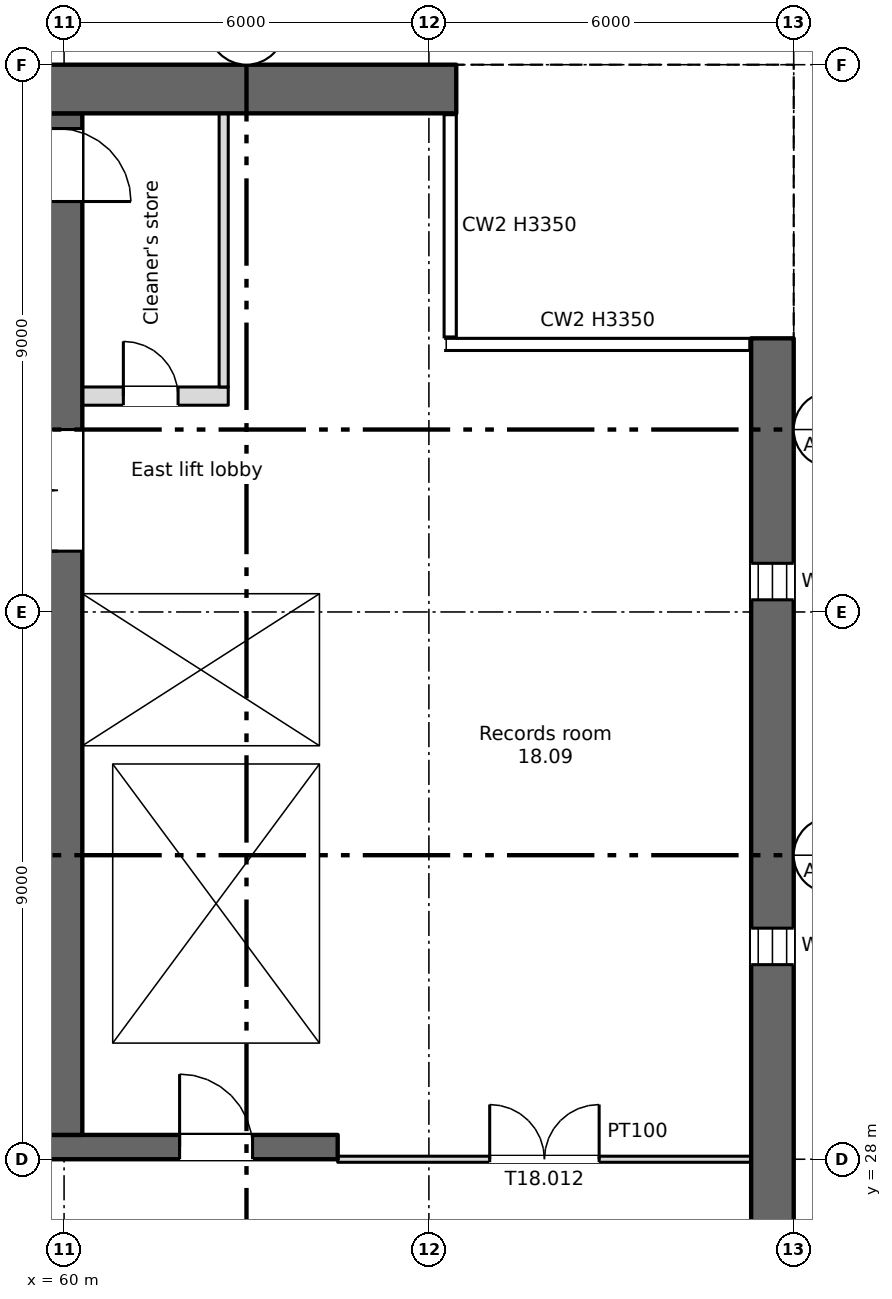
"""IFC4 building model, lengths in metres.
Left out: names, types, materials, properties, quantities, classifications, styles, units other than length and angle.
Written with IfcOpenShell. Run it as: python <this file> out.ifc"""

import sys

from ifc_helpers import new_model, si_unit, direction, frame, frame_2d, origin, place, context, subcontext, project, spatial, rectangle, extrude, element, fill, save


model = new_model("IFC4")
c1 = context("Model", 3, precision=1e-05, world=origin(), true_north=direction((0.0, 1.0)))
c2 = subcontext(c1, "Body", "Model", "MODEL_VIEW")
j1 = project(units=[si_unit("LENGTHUNIT", "METRE"), si_unit("PLANEANGLEUNIT", "RADIAN")], contexts=[c1])
p1 = place(None, origin())
s1 = spatial("IfcSite", under=j1, at=p1, CompositionType="ELEMENT")
p2 = place(p1, origin())
s2 = spatial("IfcBuilding", under=s1, at=p2, CompositionType="ELEMENT")
p3 = place(p2, frame((0.0, 0.0, 113.75)))
s3 = spatial("IfcBuildingStorey", under=s2, at=p3, CompositionType="ELEMENT", Elevation=113.75)
p4 = place(p3, frame((71.65, 6.0, 0.0), z_axis=(0.0, 0.0, 1.0), x_axis=(0.0, 1.0, 0.0)))
e1 = element("IfcWall", 1, at=p4, inside=s3, PredefinedType="SHEAR", context=c2, shape_type="SweptSolid", body=[
    extrude(rectangle(XDim=35.5, YDim=0.7, at=frame_2d((17.75, 0.0))), origin(), (0.0, 0.0, 1.0), 3.35),
])
p5 = place(p4, frame((1.2, 0.0, 0.6)))
e2 = element("IfcOpeningElement", 2, at=p5, cuts=e1, PredefinedType="OPENING", context=c2, shape_type="SweptSolid", body=[
    extrude(rectangle(XDim=0.6, YDim=2.4, at=frame_2d((0.3, 1.2))), frame((0.0, 0.36, 0.0), z_axis=(0.0, -1.0, 0.0), x_axis=(1.0, 0.0, 0.0)), (0.0, 0.0, 1.0), 0.72),
])
p6 = place(p4, frame((7.2, 0.0, 0.6)))
e3 = element("IfcOpeningElement", 3, at=p6, cuts=e1, PredefinedType="OPENING", context=c2, shape_type="SweptSolid", body=[
    extrude(rectangle(XDim=0.6, YDim=2.4, at=frame_2d((0.3, 1.2))), frame((0.0, 0.36, 0.0), z_axis=(0.0, -1.0, 0.0), x_axis=(1.0, 0.0, 0.0)), (0.0, 0.0, 1.0), 0.72),
])
p7 = place(p4, frame((13.2, 0.0, 0.6)))
e4 = element("IfcOpeningElement", 4, at=p7, cuts=e1, PredefinedType="OPENING", context=c2, shape_type="SweptSolid", body=[
    extrude(rectangle(XDim=0.6, YDim=2.4, at=frame_2d((0.3, 1.2))), frame((0.0, 0.36, 0.0), z_axis=(0.0, -1.0, 0.0), x_axis=(1.0, 0.0, 0.0)), (0.0, 0.0, 1.0), 0.72),
])
p8 = place(p4, frame((19.2, 0.0, 0.6)))
e5 = element("IfcOpeningElement", 5, at=p8, cuts=e1, PredefinedType="OPENING", context=c2, shape_type="SweptSolid", body=[
    extrude(rectangle(XDim=0.6, YDim=2.4, at=frame_2d((0.3, 1.2))), frame((0.0, 0.36, 0.0), z_axis=(0.0, -1.0, 0.0), x_axis=(1.0, 0.0, 0.0)), (0.0, 0.0, 1.0), 0.72),
])
p9 = place(p4, frame((25.2, 0.0, 0.6)))
e6 = element("IfcOpeningElement", 6, at=p9, cuts=e1, PredefinedType="OPENING", context=c2, shape_type="SweptSolid", body=[
    extrude(rectangle(XDim=0.6, YDim=2.4, at=frame_2d((0.3, 1.2))), frame((0.0, 0.36, 0.0), z_axis=(0.0, -1.0, 0.0), x_axis=(1.0, 0.0, 0.0)), (0.0, 0.0, 1.0), 0.72),
])
p10 = place(p4, frame((31.2, 0.0, 0.6)))
e7 = element("IfcOpeningElement", 7, at=p10, cuts=e1, PredefinedType="OPENING", context=c2, shape_type="SweptSolid", body=[
    extrude(rectangle(XDim=0.6, YDim=2.4, at=frame_2d((0.3, 1.2))), frame((0.0, 0.36, 0.0), z_axis=(0.0, -1.0, 0.0), x_axis=(1.0, 0.0, 0.0)), (0.0, 0.0, 1.0), 0.72),
])
p11 = place(p3, frame((5.55, 45.6, 0.0), z_axis=(0.0, 0.0, 1.0), x_axis=(1.0, 0.0, 0.0)))
e8 = element("IfcWall", 8, at=p11, inside=s3, PredefinedType="SHEAR", context=c2, shape_type="SweptSolid", body=[
    extrude(rectangle(XDim=60.9, YDim=0.8, at=frame_2d((30.45, 0.0))), origin(), (0.0, 0.0, 1.0), 3.35),
])
p12 = place(p11, frame((1.2, 0.0, 0.6)))
e9 = element("IfcOpeningElement", 9, at=p12, cuts=e8, PredefinedType="OPENING", context=c2, shape_type="SweptSolid", body=[
    extrude(rectangle(XDim=0.6, YDim=2.4, at=frame_2d((0.3, 1.2))), frame((0.0, 0.41, 0.0), z_axis=(0.0, -1.0, 0.0), x_axis=(1.0, 0.0, 0.0)), (0.0, 0.0, 1.0), 0.82),
])
p13 = place(p11, frame((7.2, 0.0, 0.6)))
e10 = element("IfcOpeningElement", 10, at=p13, cuts=e8, PredefinedType="OPENING", context=c2, shape_type="SweptSolid", body=[
    extrude(rectangle(XDim=0.6, YDim=2.4, at=frame_2d((0.3, 1.2))), frame((0.0, 0.41, 0.0), z_axis=(0.0, -1.0, 0.0), x_axis=(1.0, 0.0, 0.0)), (0.0, 0.0, 1.0), 0.82),
])
p14 = place(p3, frame((6.7, 28.2, 0.0), z_axis=(0.0, 0.0, 1.0), x_axis=(1.0, 0.0, 0.0)))
e11 = element("IfcWall", 11, at=p14, inside=s3, PredefinedType="SHEAR", context=c2, shape_type="SweptSolid", body=[
    extrude(rectangle(XDim=57.8, YDim=0.4, at=frame_2d((28.9, 0.0))), origin(), (0.0, 0.0, 1.0), 3.35),
])
p15 = place(p14, frame((12.562, 0.0, 0.0)))
e12 = element("IfcOpeningElement", 12, at=p15, cuts=e11, PredefinedType="OPENING", context=c2, shape_type="SweptSolid", body=[
    extrude(rectangle(XDim=0.9, YDim=2.1, at=frame_2d((0.45, 1.05))), frame((0.0, 0.21, 0.0), z_axis=(0.0, -1.0, 0.0), x_axis=(1.0, 0.0, 0.0)), (0.0, 0.0, 1.0), 0.42),
])
p16 = place(p14, frame((15.137, 0.0, 0.0)))
e13 = element("IfcOpeningElement", 13, at=p16, cuts=e11, PredefinedType="OPENING", context=c2, shape_type="SweptSolid", body=[
    extrude(rectangle(XDim=0.9, YDim=2.1, at=frame_2d((0.45, 1.05))), frame((0.0, 0.21, 0.0), z_axis=(0.0, -1.0, 0.0), x_axis=(1.0, 0.0, 0.0)), (0.0, 0.0, 1.0), 0.42),
])
p17 = place(p14, frame((49.85, 0.0, 0.0)))
e14 = element("IfcOpeningElement", 14, at=p17, cuts=e11, PredefinedType="OPENING", context=c2, shape_type="SweptSolid", body=[
    extrude(rectangle(XDim=0.9, YDim=2.1, at=frame_2d((0.45, 1.05))), frame((0.0, 0.21, 0.0), z_axis=(0.0, -1.0, 0.0), x_axis=(1.0, 0.0, 0.0)), (0.0, 0.0, 1.0), 0.42),
])
p18 = place(p14, frame((0.562, 0.0, 0.0)))
e15 = element("IfcOpeningElement", 15, at=p18, cuts=e11, PredefinedType="OPENING", context=c2, shape_type="SweptSolid", body=[
    extrude(rectangle(XDim=0.9, YDim=2.1, at=frame_2d((0.45, 1.05))), frame((0.0, 0.21, 0.0), z_axis=(0.0, -1.0, 0.0), x_axis=(1.0, 0.0, 0.0)), (0.0, 0.0, 1.0), 0.42),
])
p19 = place(p14, frame((2.137, 0.0, 0.0)))
e16 = element("IfcOpeningElement", 16, at=p19, cuts=e11, PredefinedType="OPENING", context=c2, shape_type="SweptSolid", body=[
    extrude(rectangle(XDim=0.9, YDim=2.1, at=frame_2d((0.45, 1.05))), frame((0.0, 0.21, 0.0), z_axis=(0.0, -1.0, 0.0), x_axis=(1.0, 0.0, 0.0)), (0.0, 0.0, 1.0), 0.42),
])
p20 = place(p14, frame((4.7, 0.0, 0.0)))
e17 = element("IfcOpeningElement", 17, at=p20, cuts=e11, PredefinedType="OPENING", context=c2, shape_type="SweptSolid", body=[
    extrude(rectangle(XDim=1.2, YDim=2.1, at=frame_2d((0.6, 1.05))), frame((0.0, 0.21, 0.0), z_axis=(0.0, -1.0, 0.0), x_axis=(1.0, 0.0, 0.0)), (0.0, 0.0, 1.0), 0.42),
])
p21 = place(p14, frame((31.7, 0.0, 0.0)))
e18 = element("IfcOpeningElement", 18, at=p21, cuts=e11, PredefinedType="OPENING", context=c2, shape_type="SweptSolid", body=[
    extrude(rectangle(XDim=1.2, YDim=2.1, at=frame_2d((0.6, 1.05))), frame((0.0, 0.21, 0.0), z_axis=(0.0, -1.0, 0.0), x_axis=(1.0, 0.0, 0.0)), (0.0, 0.0, 1.0), 0.42),
])
p22 = place(p14, frame((55.2, 0.0, 0.0)))
e19 = element("IfcOpeningElement", 19, at=p22, cuts=e11, PredefinedType="OPENING", context=c2, shape_type="SweptSolid", body=[
    extrude(rectangle(XDim=1.2, YDim=2.1, at=frame_2d((0.6, 1.05))), frame((0.0, 0.21, 0.0), z_axis=(0.0, -1.0, 0.0), x_axis=(1.0, 0.0, 0.0)), (0.0, 0.0, 1.0), 0.42),
])
p23 = place(p14, frame((21.7, 0.0, 0.0)))
e20 = element("IfcOpeningElement", 20, at=p23, cuts=e11, PredefinedType="OPENING", context=c2, shape_type="SweptSolid", body=[
    extrude(rectangle(XDim=1.2, YDim=2.1, at=frame_2d((0.6, 1.05))), frame((0.0, 0.21, 0.0), z_axis=(0.0, -1.0, 0.0), x_axis=(1.0, 0.0, 0.0)), (0.0, 0.0, 1.0), 0.42),
])
p24 = place(p14, frame((41.7, 0.0, 0.0)))
e21 = element("IfcOpeningElement", 21, at=p24, cuts=e11, PredefinedType="OPENING", context=c2, shape_type="SweptSolid", body=[
    extrude(rectangle(XDim=1.2, YDim=2.1, at=frame_2d((0.6, 1.05))), frame((0.0, 0.21, 0.0), z_axis=(0.0, -1.0, 0.0), x_axis=(1.0, 0.0, 0.0)), (0.0, 0.0, 1.0), 0.42),
])
p25 = place(p14, frame((24.85, 0.0, 0.0)))
e22 = element("IfcOpeningElement", 22, at=p25, cuts=e11, PredefinedType="OPENING", context=c2, shape_type="SweptSolid", body=[
    extrude(rectangle(XDim=2.4, YDim=2.1, at=frame_2d((1.2, 1.05))), frame((0.0, 0.21, 0.0), z_axis=(0.0, -1.0, 0.0), x_axis=(1.0, 0.0, 0.0)), (0.0, 0.0, 1.0), 0.42),
])
p26 = place(p14, frame((37.35, 0.0, 0.0)))
e23 = element("IfcOpeningElement", 23, at=p26, cuts=e11, PredefinedType="OPENING", context=c2, shape_type="SweptSolid", body=[
    extrude(rectangle(XDim=2.4, YDim=2.1, at=frame_2d((1.2, 1.05))), frame((0.0, 0.21, 0.0), z_axis=(0.0, -1.0, 0.0), x_axis=(1.0, 0.0, 0.0)), (0.0, 0.0, 1.0), 0.42),
])
p27 = place(p14, frame((7.95, 0.0, 0.0)))
e24 = element("IfcOpeningElement", 24, at=p27, cuts=e11, PredefinedType="OPENING", context=c2, shape_type="SweptSolid", body=[
    extrude(rectangle(XDim=2.4, YDim=2.1, at=frame_2d((1.2, 1.05))), frame((0.0, 0.21, 0.0), z_axis=(0.0, -1.0, 0.0), x_axis=(1.0, 0.0, 0.0)), (0.0, 0.0, 1.0), 0.42),
])
p28 = place(p14, frame((28.85, 0.0, 0.0)))
e25 = element("IfcOpeningElement", 25, at=p28, cuts=e11, PredefinedType="OPENING", context=c2, shape_type="SweptSolid", body=[
    extrude(rectangle(XDim=0.9, YDim=2.1, at=frame_2d((0.45, 1.05))), frame((0.0, 0.21, 0.0), z_axis=(0.0, -1.0, 0.0), x_axis=(1.0, 0.0, 0.0)), (0.0, 0.0, 1.0), 0.42),
])
p29 = place(p14, frame((34.85, 0.0, 0.0)))
e26 = element("IfcOpeningElement", 26, at=p29, cuts=e11, PredefinedType="OPENING", context=c2, shape_type="SweptSolid", body=[
    extrude(rectangle(XDim=0.9, YDim=2.1, at=frame_2d((0.45, 1.05))), frame((0.0, 0.21, 0.0), z_axis=(0.0, -1.0, 0.0), x_axis=(1.0, 0.0, 0.0)), (0.0, 0.0, 1.0), 0.42),
])
p30 = place(p3, frame((64.35, 34.8, 0.0), z_axis=(0.0, 0.0, 1.0), x_axis=(0.0, 1.0, 0.0)))
e27 = element("IfcWall", 27, at=p30, inside=s3, PredefinedType="SHEAR", context=c2, shape_type="SweptSolid", body=[
    extrude(rectangle(XDim=10.4, YDim=0.3, at=frame_2d((5.2, 0.0))), origin(), (0.0, 0.0, 1.0), 3.35),
])
p31 = place(p3, frame((59.9, 28.4, 0.0), z_axis=(0.0, 0.0, 1.0), x_axis=(0.0, 1.0, 0.0)))
e28 = element("IfcWall", 28, at=p31, inside=s3, PredefinedType="SHEAR", context=c2, shape_type="SweptSolid", body=[
    extrude(rectangle(XDim=16.8, YDim=0.8, at=frame_2d((8.4, 0.0))), origin(), (0.0, 0.0, 1.0), 3.35),
])
p32 = place(p31, frame((9.6, 0.0, 0.0)))
e29 = element("IfcOpeningElement", 29, at=p32, cuts=e28, PredefinedType="OPENING", context=c2, shape_type="SweptSolid", body=[
    extrude(rectangle(XDim=2.0, YDim=2.1, at=frame_2d((1.0, 1.05))), frame((0.0, 0.41, 0.0), z_axis=(0.0, -1.0, 0.0), x_axis=(1.0, 0.0, 0.0)), (0.0, 0.0, 1.0), 0.82),
])
p33 = place(p31, frame((15.35, 0.0, 0.0)))
e30 = element("IfcOpeningElement", 30, at=p33, cuts=e28, PredefinedType="OPENING", context=c2, shape_type="SweptSolid", body=[
    extrude(rectangle(XDim=1.2, YDim=2.1, at=frame_2d((0.6, 1.05))), frame((0.0, 0.41, 0.0), z_axis=(0.0, -1.0, 0.0), x_axis=(1.0, 0.0, 0.0)), (0.0, 0.0, 1.0), 0.82),
])
p34 = place(p3, frame((60.55, 28.4, 0.0), z_axis=(0.0, 0.0, 1.0), x_axis=(0.0, 1.0, 0.0)))
e31 = element("IfcWall", 31, at=p34, inside=s3, PredefinedType="SHEAR", context=c2, shape_type="SweptSolid", body=[
    extrude(rectangle(XDim=6.1, YDim=0.5, at=frame_2d((3.05, 0.0))), origin(), (0.0, 0.0, 1.0), 3.35),
])
p35 = place(p3, frame((64.35, 28.4, 0.0), z_axis=(0.0, 0.0, 1.0), x_axis=(0.0, 1.0, 0.0)))
e32 = element("IfcWall", 32, at=p35, inside=s3, PredefinedType="SHEAR", context=c2, shape_type="SweptSolid", body=[
    extrude(rectangle(XDim=6.1, YDim=0.3, at=frame_2d((3.05, 0.0))), origin(), (0.0, 0.0, 1.0), 3.35),
])
p36 = place(p3, frame((60.3, 34.65, 0.0), z_axis=(0.0, 0.0, 1.0), x_axis=(1.0, 0.0, 0.0)))
e33 = element("IfcWall", 33, at=p36, inside=s3, PredefinedType="SHEAR", context=c2, shape_type="SweptSolid", body=[
    extrude(rectangle(XDim=4.2, YDim=0.3, at=frame_2d((2.1, 0.0))), origin(), (0.0, 0.0, 1.0), 3.35),
])
p37 = place(p3, frame((60.3, 37.45, 0.0), z_axis=(0.0, 0.0, 1.0), x_axis=(1.0, 0.0, 0.0)))
e34 = element("IfcWall", 34, at=p37, inside=s3, PredefinedType="SHEAR", context=c2, shape_type="SweptSolid", body=[
    extrude(rectangle(XDim=3.9, YDim=0.3, at=frame_2d((1.95, 0.0))), origin(), (0.0, 0.0, 1.0), 3.35),
])
p38 = place(p37, frame((1.4, 0.0, 0.0)))
e35 = element("IfcOpeningElement", 35, at=p38, cuts=e34, PredefinedType="OPENING", context=c2, shape_type="SweptSolid", body=[
    extrude(rectangle(XDim=1.1, YDim=2.1, at=frame_2d((0.55, 1.05))), frame((0.0, 0.16, 0.0), z_axis=(0.0, -1.0, 0.0), x_axis=(1.0, 0.0, 0.0)), (0.0, 0.0, 1.0), 0.32),
])
p39 = place(p3, frame((60.3, 40.55, 0.0), z_axis=(0.0, 0.0, 1.0), x_axis=(1.0, 0.0, 0.0)))
e36 = element("IfcWall", 36, at=p39, inside=s3, PredefinedType="PARTITIONING", context=c2, shape_type="SweptSolid", body=[
    extrude(rectangle(XDim=2.4, YDim=0.3, at=frame_2d((1.2, 0.0))), origin(), (0.0, 0.0, 1.0), 3.35),
])
p40 = place(p39, frame((0.675, 0.0, 0.0)))
e37 = element("IfcOpeningElement", 37, at=p40, cuts=e36, PredefinedType="OPENING", context=c2, shape_type="SweptSolid", body=[
    extrude(rectangle(XDim=0.9, YDim=2.1, at=frame_2d((0.45, 1.05))), frame((0.0, 0.16, 0.0), z_axis=(0.0, -1.0, 0.0), x_axis=(1.0, 0.0, 0.0)), (0.0, 0.0, 1.0), 0.32),
])
p41 = place(p3, frame((62.625, 40.7, 0.0), z_axis=(0.0, 0.0, 1.0), x_axis=(0.0, 1.0, 0.0)))
e38 = element("IfcWall", 38, at=p41, inside=s3, PredefinedType="PARTITIONING", context=c2, shape_type="SweptSolid", body=[
    extrude(rectangle(XDim=4.5, YDim=0.15, at=frame_2d((2.25, 0.0))), origin(), (0.0, 0.0, 1.0), 3.35),
])
p42 = place(p3, frame((64.5, 28.0, 0.0), z_axis=(0.0, 0.0, 1.0), x_axis=(1.0, 0.0, 0.0)))
e39 = element("IfcWall", 39, at=p42, inside=s3, PredefinedType="PARTITIONING", context=c2, shape_type="SweptSolid", body=[
    extrude(rectangle(XDim=6.8, YDim=0.1, at=frame_2d((3.4, 0.0))), origin(), (0.0, 0.0, 1.0), 3.35),
])
p43 = place(p42, frame((2.5, 0.0, 0.0)))
e40 = element("IfcOpeningElement", 40, at=p43, cuts=e39, PredefinedType="OPENING", context=c2, shape_type="SweptSolid", body=[
    extrude(rectangle(XDim=1.8, YDim=2.1, at=frame_2d((0.9, 1.05))), frame((0.0, 0.06, 0.0), z_axis=(0.0, -1.0, 0.0), x_axis=(1.0, 0.0, 0.0)), (0.0, 0.0, 1.0), 0.12),
])
p44 = place(p9, origin())
e41 = element("IfcWindow", 41, at=p44, inside=s3, PartitioningType="SINGLE_PANEL", PredefinedType="WINDOW", context=c2, shape_type="SweptSolid", body=[
    extrude(rectangle(XDim=0.6, YDim=2.4, at=frame_2d((0.3, 1.2))), frame((0.0, 0.03, 0.0), z_axis=(0.0, -1.0, 0.0), x_axis=(1.0, 0.0, 0.0)), (0.0, 0.0, 1.0), 0.06),
])
fill(e6, e41)
p45 = place(p10, origin())
e42 = element("IfcWindow", 42, at=p45, inside=s3, PartitioningType="SINGLE_PANEL", PredefinedType="WINDOW", context=c2, shape_type="SweptSolid", body=[
    extrude(rectangle(XDim=0.6, YDim=2.4, at=frame_2d((0.3, 1.2))), frame((0.0, 0.03, 0.0), z_axis=(0.0, -1.0, 0.0), x_axis=(1.0, 0.0, 0.0)), (0.0, 0.0, 1.0), 0.06),
])
fill(e7, e42)
p46 = place(p40, origin())
e43 = element("IfcDoor", 43, at=p46, inside=s3, OperationType="SINGLE_SWING_LEFT", PredefinedType="DOOR", context=c2, shape_type="SweptSolid", body=[
    extrude(rectangle(XDim=0.9, YDim=2.1, at=frame_2d((0.45, 1.05))), frame((0.0, 0.025, 0.0), z_axis=(0.0, -1.0, 0.0), x_axis=(1.0, 0.0, 0.0)), (0.0, 0.0, 1.0), 0.05),
])
fill(e37, e43)
p47 = place(p38, origin())
e44 = element("IfcDoor", 44, at=p47, inside=s3, OperationType="SLIDING_TO_LEFT", PredefinedType="DOOR", context=c2, shape_type="SweptSolid", body=[
    extrude(rectangle(XDim=1.1, YDim=2.1, at=frame_2d((0.55, 1.05))), frame((0.0, 0.025, 0.0), z_axis=(0.0, -1.0, 0.0), x_axis=(1.0, 0.0, 0.0)), (0.0, 0.0, 1.0), 0.05),
])
fill(e35, e44)
p48 = place(p22, origin())
e45 = element("IfcDoor", 45, at=p48, inside=s3, OperationType="SINGLE_SWING_LEFT", PredefinedType="DOOR", context=c2, shape_type="SweptSolid", body=[
    extrude(rectangle(XDim=1.2, YDim=2.1, at=frame_2d((0.6, 1.05))), frame((0.0, 0.025, 0.0), z_axis=(0.0, -1.0, 0.0), x_axis=(1.0, 0.0, 0.0)), (0.0, 0.0, 1.0), 0.05),
])
fill(e19, e45)
p49 = place(p32, origin())
e46 = element("IfcDoor", 46, at=p49, inside=s3, OperationType="DOUBLE_DOOR_SINGLE_SWING", PredefinedType="DOOR", context=c2, shape_type="SweptSolid", body=[
    extrude(rectangle(XDim=2.0, YDim=2.1, at=frame_2d((1.0, 1.05))), frame((0.0, 0.025, 0.0), z_axis=(0.0, -1.0, 0.0), x_axis=(1.0, 0.0, 0.0)), (0.0, 0.0, 1.0), 0.05),
])
fill(e29, e46)
p50 = place(p33, origin())
e47 = element("IfcDoor", 47, at=p50, inside=s3, OperationType="SINGLE_SWING_LEFT", PredefinedType="DOOR", context=c2, shape_type="SweptSolid", body=[
    extrude(rectangle(XDim=1.2, YDim=2.1, at=frame_2d((0.6, 1.05))), frame((0.0, 0.025, 0.0), z_axis=(0.0, -1.0, 0.0), x_axis=(1.0, 0.0, 0.0)), (0.0, 0.0, 1.0), 0.05),
])
fill(e30, e47)
p51 = place(p43, origin())
e48 = element("IfcDoor", 48, at=p51, inside=s3, OperationType="DOUBLE_DOOR_SINGLE_SWING", PredefinedType="DOOR", context=c2, shape_type="SweptSolid", body=[
    extrude(rectangle(XDim=1.8, YDim=2.1, at=frame_2d((0.9, 1.05))), frame((0.0, 0.025, 0.0), z_axis=(0.0, -1.0, 0.0), x_axis=(1.0, 0.0, 0.0)), (0.0, 0.0, 1.0), 0.05),
])
fill(e40, e48)
save(model, sys.argv[1])
